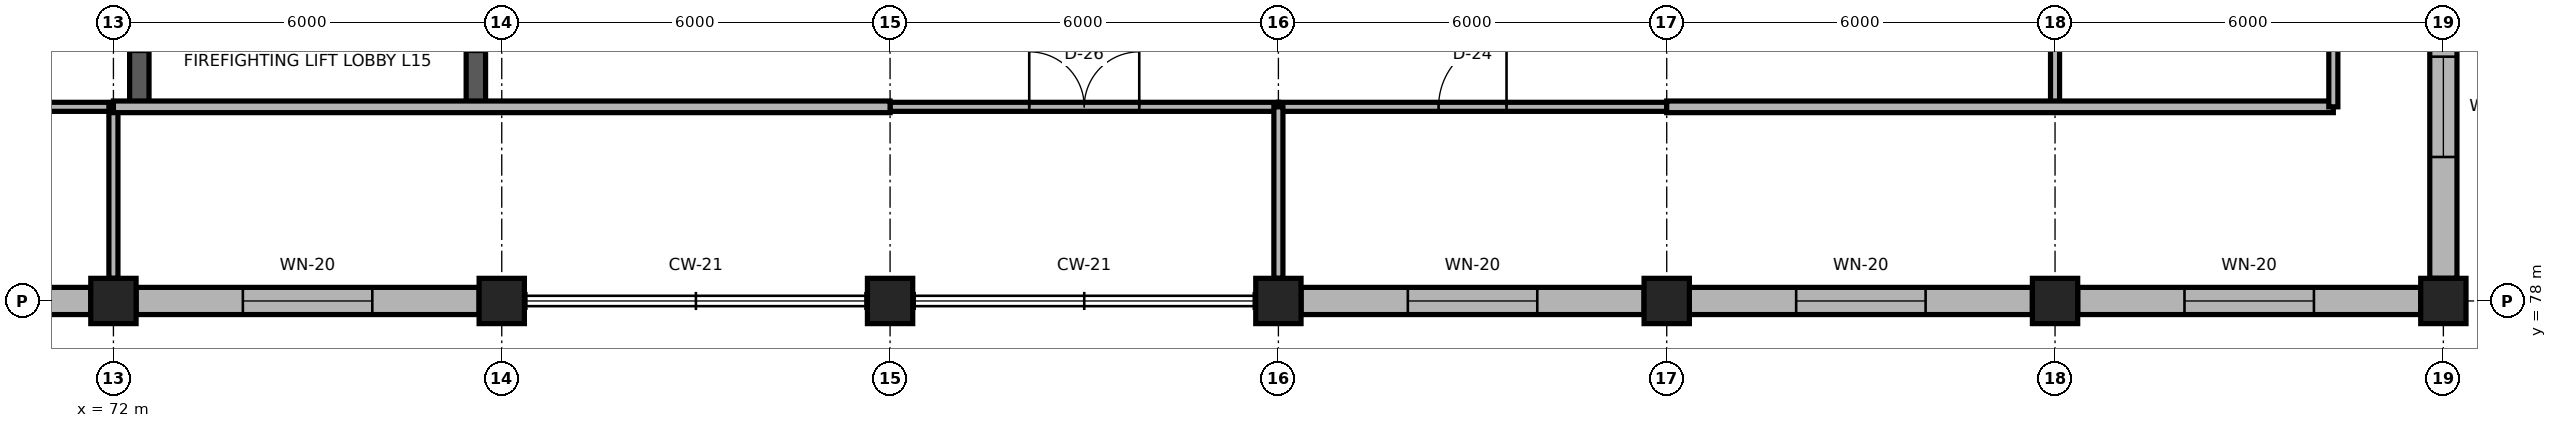
"""IFC4 building model, lengths in metres.
Left out: names, types, materials, properties, quantities, classifications, styles, units other than length and angle.
Written with IfcOpenShell. Run it as: python <this file> out.ifc"""

import sys

from ifc_helpers import new_model, si_unit, direction, frame, frame_2d, origin, origin_2d, place, context, subcontext, project, spatial, rectangle, extrude, element, fill, save


model = new_model("IFC4")
c1 = context("Model", 3, precision=1e-05, world=origin(), true_north=direction((0.0, 1.0)))
c2 = subcontext(c1, "Body", "Model", "MODEL_VIEW")
j1 = project(units=[si_unit("LENGTHUNIT", "METRE"), si_unit("PLANEANGLEUNIT", "RADIAN")], contexts=[c1])
p1 = place(None, origin())
s1 = spatial("IfcSite", under=j1, at=p1, CompositionType="ELEMENT")
p2 = place(p1, origin())
s2 = spatial("IfcBuilding", under=s1, at=p2, CompositionType="ELEMENT")
p3 = place(p2, frame((0.0, 0.0, 60.0)))
s3 = spatial("IfcBuildingStorey", under=s2, at=p3, CompositionType="ELEMENT", Elevation=60.0)
for number, where, z_axis, x_axis in (
    (1, (72.0, 78.0, 0.0), (0.0, 0.0, 1.0), (1.0, 0.0, 0.0)),
    (2, (78.0, 78.0, 0.0), (0.0, 0.0, 1.0), (1.0, 0.0, 0.0)),
    (3, (84.0, 78.0, 0.0), (0.0, 0.0, 1.0), (1.0, 0.0, 0.0)),
    (4, (90.0, 78.0, 0.0), (0.0, 0.0, 1.0), (1.0, 0.0, 0.0)),
    (5, (96.0, 78.0, 0.0), (0.0, 0.0, 1.0), (1.0, 0.0, 0.0)),
    (6, (102.0, 78.0, 0.0), (0.0, 0.0, 1.0), (1.0, 0.0, 0.0)),
    (7, (108.0, 78.0, 0.0), (0.0, 0.0, 1.0), (1.0, 0.0, 0.0)),
):
    element("IfcColumn", number, at=place(p3, frame(where, z_axis=z_axis, x_axis=x_axis)), inside=s3, PredefinedType="COLUMN", context=c2, shape_type="SweptSolid", body=[
        extrude(rectangle(XDim=0.7, YDim=0.7, at=origin_2d()), origin(), (0.0, 0.0, 1.0), 3.9),
    ])
p4 = place(p3, frame((66.35, 78.0, 0.0), z_axis=(0.0, 0.0, 1.0), x_axis=(1.0, 0.0, 0.0)))
e8 = element("IfcWall", 8, at=p4, inside=s3, PredefinedType="SOLIDWALL", context=c2, shape_type="SweptSolid", body=[
    extrude(rectangle(XDim=5.3, YDim=0.42, at=frame_2d((2.65, 0.0))), origin(), (0.0, 0.0, 1.0), 3.32),
])
p5 = place(p4, frame((1.65, 0.0, 0.85)))
e9 = element("IfcOpeningElement", 9, at=p5, cuts=e8, PredefinedType="OPENING", context=c2, shape_type="SweptSolid", body=[
    extrude(rectangle(XDim=2.0, YDim=1.95, at=frame_2d((1.0, 0.975))), frame((0.0, 0.225, 0.0), z_axis=(0.0, -1.0, 0.0), x_axis=(1.0, 0.0, 0.0)), (0.0, 0.0, 1.0), 0.45),
])
p6 = place(p3, frame((72.35, 78.0, 0.0), z_axis=(0.0, 0.0, 1.0), x_axis=(1.0, 0.0, 0.0)))
e10 = element("IfcWall", 10, at=p6, inside=s3, PredefinedType="SOLIDWALL", context=c2, shape_type="SweptSolid", body=[
    extrude(rectangle(XDim=5.3, YDim=0.42, at=frame_2d((2.65, 0.0))), origin(), (0.0, 0.0, 1.0), 3.32),
])
p7 = place(p6, frame((1.65, 0.0, 0.85)))
e11 = element("IfcOpeningElement", 11, at=p7, cuts=e10, PredefinedType="OPENING", context=c2, shape_type="SweptSolid", body=[
    extrude(rectangle(XDim=2.0, YDim=1.95, at=frame_2d((1.0, 0.975))), frame((0.0, 0.225, 0.0), z_axis=(0.0, -1.0, 0.0), x_axis=(1.0, 0.0, 0.0)), (0.0, 0.0, 1.0), 0.45),
])
p8 = place(p3, frame((90.35, 78.0, 0.0), z_axis=(0.0, 0.0, 1.0), x_axis=(1.0, 0.0, 0.0)))
e12 = element("IfcWall", 12, at=p8, inside=s3, PredefinedType="SOLIDWALL", context=c2, shape_type="SweptSolid", body=[
    extrude(rectangle(XDim=5.3, YDim=0.42, at=frame_2d((2.65, 0.0))), origin(), (0.0, 0.0, 1.0), 3.32),
])
p9 = place(p8, frame((1.65, 0.0, 0.85)))
e13 = element("IfcOpeningElement", 13, at=p9, cuts=e12, PredefinedType="OPENING", context=c2, shape_type="SweptSolid", body=[
    extrude(rectangle(XDim=2.0, YDim=1.95, at=frame_2d((1.0, 0.975))), frame((0.0, 0.225, 0.0), z_axis=(0.0, -1.0, 0.0), x_axis=(1.0, 0.0, 0.0)), (0.0, 0.0, 1.0), 0.45),
])
p10 = place(p3, frame((96.35, 78.0, 0.0), z_axis=(0.0, 0.0, 1.0), x_axis=(1.0, 0.0, 0.0)))
e14 = element("IfcWall", 14, at=p10, inside=s3, PredefinedType="SOLIDWALL", context=c2, shape_type="SweptSolid", body=[
    extrude(rectangle(XDim=5.3, YDim=0.42, at=frame_2d((2.65, 0.0))), origin(), (0.0, 0.0, 1.0), 3.32),
])
p11 = place(p10, frame((1.65, 0.0, 0.85)))
e15 = element("IfcOpeningElement", 15, at=p11, cuts=e14, PredefinedType="OPENING", context=c2, shape_type="SweptSolid", body=[
    extrude(rectangle(XDim=2.0, YDim=1.95, at=frame_2d((1.0, 0.975))), frame((0.0, 0.225, 0.0), z_axis=(0.0, -1.0, 0.0), x_axis=(1.0, 0.0, 0.0)), (0.0, 0.0, 1.0), 0.45),
])
p12 = place(p3, frame((102.35, 78.0, 0.0), z_axis=(0.0, 0.0, 1.0), x_axis=(1.0, 0.0, 0.0)))
e16 = element("IfcWall", 16, at=p12, inside=s3, PredefinedType="SOLIDWALL", context=c2, shape_type="SweptSolid", body=[
    extrude(rectangle(XDim=5.3, YDim=0.42, at=frame_2d((2.65, 0.0))), origin(), (0.0, 0.0, 1.0), 3.32),
])
p13 = place(p12, frame((1.65, 0.0, 0.85)))
e17 = element("IfcOpeningElement", 17, at=p13, cuts=e16, PredefinedType="OPENING", context=c2, shape_type="SweptSolid", body=[
    extrude(rectangle(XDim=2.0, YDim=1.95, at=frame_2d((1.0, 0.975))), frame((0.0, 0.225, 0.0), z_axis=(0.0, -1.0, 0.0), x_axis=(1.0, 0.0, 0.0)), (0.0, 0.0, 1.0), 0.45),
])
p14 = place(p3, frame((108.0, 78.35, 0.0), z_axis=(0.0, 0.0, 1.0), x_axis=(0.0, 1.0, 0.0)))
e18 = element("IfcWall", 18, at=p14, inside=s3, PredefinedType="SOLIDWALL", context=c2, shape_type="SweptSolid", body=[
    extrude(rectangle(XDim=5.3, YDim=0.42, at=frame_2d((2.65, 0.0))), origin(), (0.0, 0.0, 1.0), 3.32),
])
p15 = place(p14, frame((1.875, 0.0, 0.85)))
e19 = element("IfcOpeningElement", 19, at=p15, cuts=e18, PredefinedType="OPENING", context=c2, shape_type="SweptSolid", body=[
    extrude(rectangle(XDim=1.55, YDim=1.9, at=frame_2d((0.775, 0.95))), frame((0.0, 0.225, 0.0), z_axis=(0.0, -1.0, 0.0), x_axis=(1.0, 0.0, 0.0)), (0.0, 0.0, 1.0), 0.45),
])
p16 = place(p3, frame((72.4, 81.0, 0.0), z_axis=(0.0, 0.0, 1.0), x_axis=(0.0, 1.0, 0.0)))
e20 = element("IfcWall", 20, at=p16, inside=s3, PredefinedType="SHEAR", context=c2, shape_type="SweptSolid", body=[
    extrude(rectangle(XDim=3.0, YDim=0.3, at=frame_2d((1.5, 0.0))), origin(), (0.0, 0.0, 1.0), 3.74),
])
p17 = place(p16, frame((0.85, 0.0, 0.0)))
e21 = element("IfcOpeningElement", 21, at=p17, cuts=e20, PredefinedType="OPENING", context=c2, shape_type="SweptSolid", body=[
    extrude(rectangle(XDim=1.3, YDim=2.2, at=frame_2d((0.65, 1.1))), frame((0.0, 0.165, 0.0), z_axis=(0.0, -1.0, 0.0), x_axis=(1.0, 0.0, 0.0)), (0.0, 0.0, 1.0), 0.33),
])
p18 = place(p3, frame((77.6, 81.0, 0.0), z_axis=(0.0, 0.0, 1.0), x_axis=(0.0, 1.0, 0.0)))
e22 = element("IfcWall", 22, at=p18, inside=s3, PredefinedType="SHEAR", context=c2, shape_type="SweptSolid", body=[
    extrude(rectangle(XDim=3.0, YDim=0.3, at=frame_2d((1.5, 0.0))), origin(), (0.0, 0.0, 1.0), 3.74),
])
p19 = place(p18, frame((0.85, 0.0, 0.0)))
e23 = element("IfcOpeningElement", 23, at=p19, cuts=e22, PredefinedType="OPENING", context=c2, shape_type="SweptSolid", body=[
    extrude(rectangle(XDim=1.3, YDim=2.2, at=frame_2d((0.65, 1.1))), frame((0.0, 0.165, 0.0), z_axis=(0.0, -1.0, 0.0), x_axis=(1.0, 0.0, 0.0)), (0.0, 0.0, 1.0), 0.33),
])
p20 = place(p3, frame((102.0, 81.05, 0.0), z_axis=(0.0, 0.0, 1.0), x_axis=(0.0, 1.0, 0.0)))
e24 = element("IfcWall", 24, at=p20, inside=s3, PredefinedType="PARTITIONING", context=c2, shape_type="SweptSolid", body=[
    extrude(rectangle(XDim=2.9, YDim=0.14, at=frame_2d((1.45, 0.0))), origin(), (0.0, 0.0, 1.0), 3.449),
])
p21 = place(p20, frame((0.925, 0.0, 0.0)))
e25 = element("IfcOpeningElement", 25, at=p21, cuts=e24, PredefinedType="OPENING", context=c2, shape_type="SweptSolid", body=[
    extrude(rectangle(XDim=1.05, YDim=2.25, at=frame_2d((0.525, 1.125))), frame((0.0, 0.085, 0.0), z_axis=(0.0, -1.0, 0.0), x_axis=(1.0, 0.0, 0.0)), (0.0, 0.0, 1.0), 0.17),
])
p22 = place(p3, frame((66.0, 81.0, 0.0), z_axis=(0.0, 0.0, 1.0), x_axis=(1.0, 0.0, 0.0)))
e26 = element("IfcWall", 26, at=p22, inside=s3, PredefinedType="PARTITIONING", context=c2, shape_type="SweptSolid", body=[
    extrude(rectangle(XDim=6.0, YDim=0.14, at=frame_2d((3.0, 0.0))), origin(), (0.0, 0.0, 1.0), 3.74),
])
p23 = place(p22, frame((2.475, 0.0, 0.0)))
e27 = element("IfcOpeningElement", 27, at=p23, cuts=e26, PredefinedType="OPENING", context=c2, shape_type="SweptSolid", body=[
    extrude(rectangle(XDim=1.05, YDim=2.25, at=frame_2d((0.525, 1.125))), frame((0.0, 0.085, 0.0), z_axis=(0.0, -1.0, 0.0), x_axis=(1.0, 0.0, 0.0)), (0.0, 0.0, 1.0), 0.17),
])
p24 = place(p3, frame((84.0, 81.0, 0.0), z_axis=(0.0, 0.0, 1.0), x_axis=(1.0, 0.0, 0.0)))
e28 = element("IfcWall", 28, at=p24, inside=s3, PredefinedType="PARTITIONING", context=c2, shape_type="SweptSolid", body=[
    extrude(rectangle(XDim=6.0, YDim=0.14, at=frame_2d((3.0, 0.0))), origin(), (0.0, 0.0, 1.0), 3.74),
])
p25 = place(p24, frame((2.15, 0.0, 0.0)))
e29 = element("IfcOpeningElement", 29, at=p25, cuts=e28, PredefinedType="OPENING", context=c2, shape_type="SweptSolid", body=[
    extrude(rectangle(XDim=1.7, YDim=2.45, at=frame_2d((0.85, 1.225))), frame((0.0, 0.085, 0.0), z_axis=(0.0, -1.0, 0.0), x_axis=(1.0, 0.0, 0.0)), (0.0, 0.0, 1.0), 0.17),
])
p26 = place(p3, frame((90.0, 81.0, 0.0), z_axis=(0.0, 0.0, 1.0), x_axis=(1.0, 0.0, 0.0)))
e30 = element("IfcWall", 30, at=p26, inside=s3, PredefinedType="PARTITIONING", context=c2, shape_type="SweptSolid", body=[
    extrude(rectangle(XDim=6.0, YDim=0.14, at=frame_2d((3.0, 0.0))), origin(), (0.0, 0.0, 1.0), 3.74),
])
p27 = place(p26, frame((2.475, 0.0, 0.0)))
e31 = element("IfcOpeningElement", 31, at=p27, cuts=e30, PredefinedType="OPENING", context=c2, shape_type="SweptSolid", body=[
    extrude(rectangle(XDim=1.05, YDim=2.25, at=frame_2d((0.525, 1.125))), frame((0.0, 0.085, 0.0), z_axis=(0.0, -1.0, 0.0), x_axis=(1.0, 0.0, 0.0)), (0.0, 0.0, 1.0), 0.17),
])
for number, where, z_axis, x_axis in (
    (32, (72.0, 78.35, 0.0), (0.0, 0.0, 1.0), (0.0, 1.0, 0.0)),
    (33, (90.0, 78.35, 0.0), (0.0, 0.0, 1.0), (0.0, 1.0, 0.0)),
):
    element("IfcWall", number, at=place(p3, frame(where, z_axis=z_axis, x_axis=x_axis)), inside=s3, PredefinedType="PARTITIONING", context=c2, shape_type="SweptSolid", body=[
        extrude(rectangle(XDim=2.65, YDim=0.14, at=frame_2d((1.325, 0.0))), origin(), (0.0, 0.0, 1.0), 3.449),
    ])
p28 = place(p3, frame((72.0, 81.0, 0.0), z_axis=(0.0, 0.0, 1.0), x_axis=(1.0, 0.0, 0.0)))
e34 = element("IfcWall", 34, at=p28, inside=s3, PredefinedType="PARTITIONING", context=c2, shape_type="SweptSolid", body=[
    extrude(rectangle(XDim=12.0, YDim=0.18, at=frame_2d((6.0, 0.0))), origin(), (0.0, 0.0, 1.0), 3.74),
])
p29 = place(p3, frame((96.0, 81.0, 0.0), z_axis=(0.0, 0.0, 1.0), x_axis=(1.0, 0.0, 0.0)))
e35 = element("IfcWall", 35, at=p29, inside=s3, PredefinedType="PARTITIONING", context=c2, shape_type="SweptSolid", body=[
    extrude(rectangle(XDim=10.3, YDim=0.18, at=frame_2d((5.15, 0.0))), origin(), (0.0, 0.0, 1.0), 3.74),
])
p30 = place(p3, frame((106.3, 81.0, 0.0), z_axis=(0.0, 0.0, 1.0), x_axis=(0.0, 1.0, 0.0)))
e36 = element("IfcWall", 36, at=p30, inside=s3, PredefinedType="PARTITIONING", context=c2, shape_type="SweptSolid", body=[
    extrude(rectangle(XDim=1.15, YDim=0.14, at=frame_2d((0.575, 0.0))), origin(), (0.0, 0.0, 1.0), 3.74),
])
p31 = place(p7, origin())
e37 = element("IfcWindow", 37, at=p31, inside=s3, PartitioningType="SINGLE_PANEL", PredefinedType="WINDOW", context=c2, shape_type="SweptSolid", body=[
    extrude(rectangle(XDim=2.0, YDim=1.95, at=frame_2d((1.0, 0.975))), frame((0.0, 0.03, 0.0), z_axis=(0.0, -1.0, 0.0), x_axis=(1.0, 0.0, 0.0)), (0.0, 0.0, 1.0), 0.06),
])
fill(e11, e37)
p32 = place(p9, origin())
e38 = element("IfcWindow", 38, at=p32, inside=s3, PartitioningType="SINGLE_PANEL", PredefinedType="WINDOW", context=c2, shape_type="SweptSolid", body=[
    extrude(rectangle(XDim=2.0, YDim=1.95, at=frame_2d((1.0, 0.975))), frame((0.0, 0.03, 0.0), z_axis=(0.0, -1.0, 0.0), x_axis=(1.0, 0.0, 0.0)), (0.0, 0.0, 1.0), 0.06),
])
fill(e13, e38)
p33 = place(p11, origin())
e39 = element("IfcWindow", 39, at=p33, inside=s3, PartitioningType="SINGLE_PANEL", PredefinedType="WINDOW", context=c2, shape_type="SweptSolid", body=[
    extrude(rectangle(XDim=2.0, YDim=1.95, at=frame_2d((1.0, 0.975))), frame((0.0, 0.03, 0.0), z_axis=(0.0, -1.0, 0.0), x_axis=(1.0, 0.0, 0.0)), (0.0, 0.0, 1.0), 0.06),
])
fill(e15, e39)
p34 = place(p13, origin())
e40 = element("IfcWindow", 40, at=p34, inside=s3, PartitioningType="SINGLE_PANEL", PredefinedType="WINDOW", context=c2, shape_type="SweptSolid", body=[
    extrude(rectangle(XDim=2.0, YDim=1.95, at=frame_2d((1.0, 0.975))), frame((0.0, 0.03, 0.0), z_axis=(0.0, -1.0, 0.0), x_axis=(1.0, 0.0, 0.0)), (0.0, 0.0, 1.0), 0.06),
])
fill(e17, e40)
p35 = place(p15, origin())
e41 = element("IfcWindow", 41, at=p35, inside=s3, PartitioningType="SINGLE_PANEL", PredefinedType="WINDOW", context=c2, shape_type="SweptSolid", body=[
    extrude(rectangle(XDim=1.55, YDim=1.9, at=frame_2d((0.775, 0.95))), frame((0.0, 0.03, 0.0), z_axis=(0.0, -1.0, 0.0), x_axis=(1.0, 0.0, 0.0)), (0.0, 0.0, 1.0), 0.06),
])
fill(e19, e41)
p36 = place(p25, origin())
e42 = element("IfcDoor", 42, at=p36, inside=s3, OperationType="DOUBLE_DOOR_SINGLE_SWING", PredefinedType="DOOR", context=c2, shape_type="SweptSolid", body=[
    extrude(rectangle(XDim=1.7, YDim=2.45, at=frame_2d((0.85, 1.225))), frame((0.0, 0.025, 0.0), z_axis=(0.0, -1.0, 0.0), x_axis=(1.0, 0.0, 0.0)), (0.0, 0.0, 1.0), 0.05),
])
fill(e29, e42)
p37 = place(p27, origin())
e43 = element("IfcDoor", 43, at=p37, inside=s3, OperationType="SINGLE_SWING_RIGHT", PredefinedType="DOOR", context=c2, shape_type="SweptSolid", body=[
    extrude(rectangle(XDim=1.05, YDim=2.25, at=frame_2d((0.525, 1.125))), frame((0.0, 0.025, 0.0), z_axis=(0.0, -1.0, 0.0), x_axis=(1.0, 0.0, 0.0)), (0.0, 0.0, 1.0), 0.05),
])
fill(e31, e43)
save(model, sys.argv[1])
